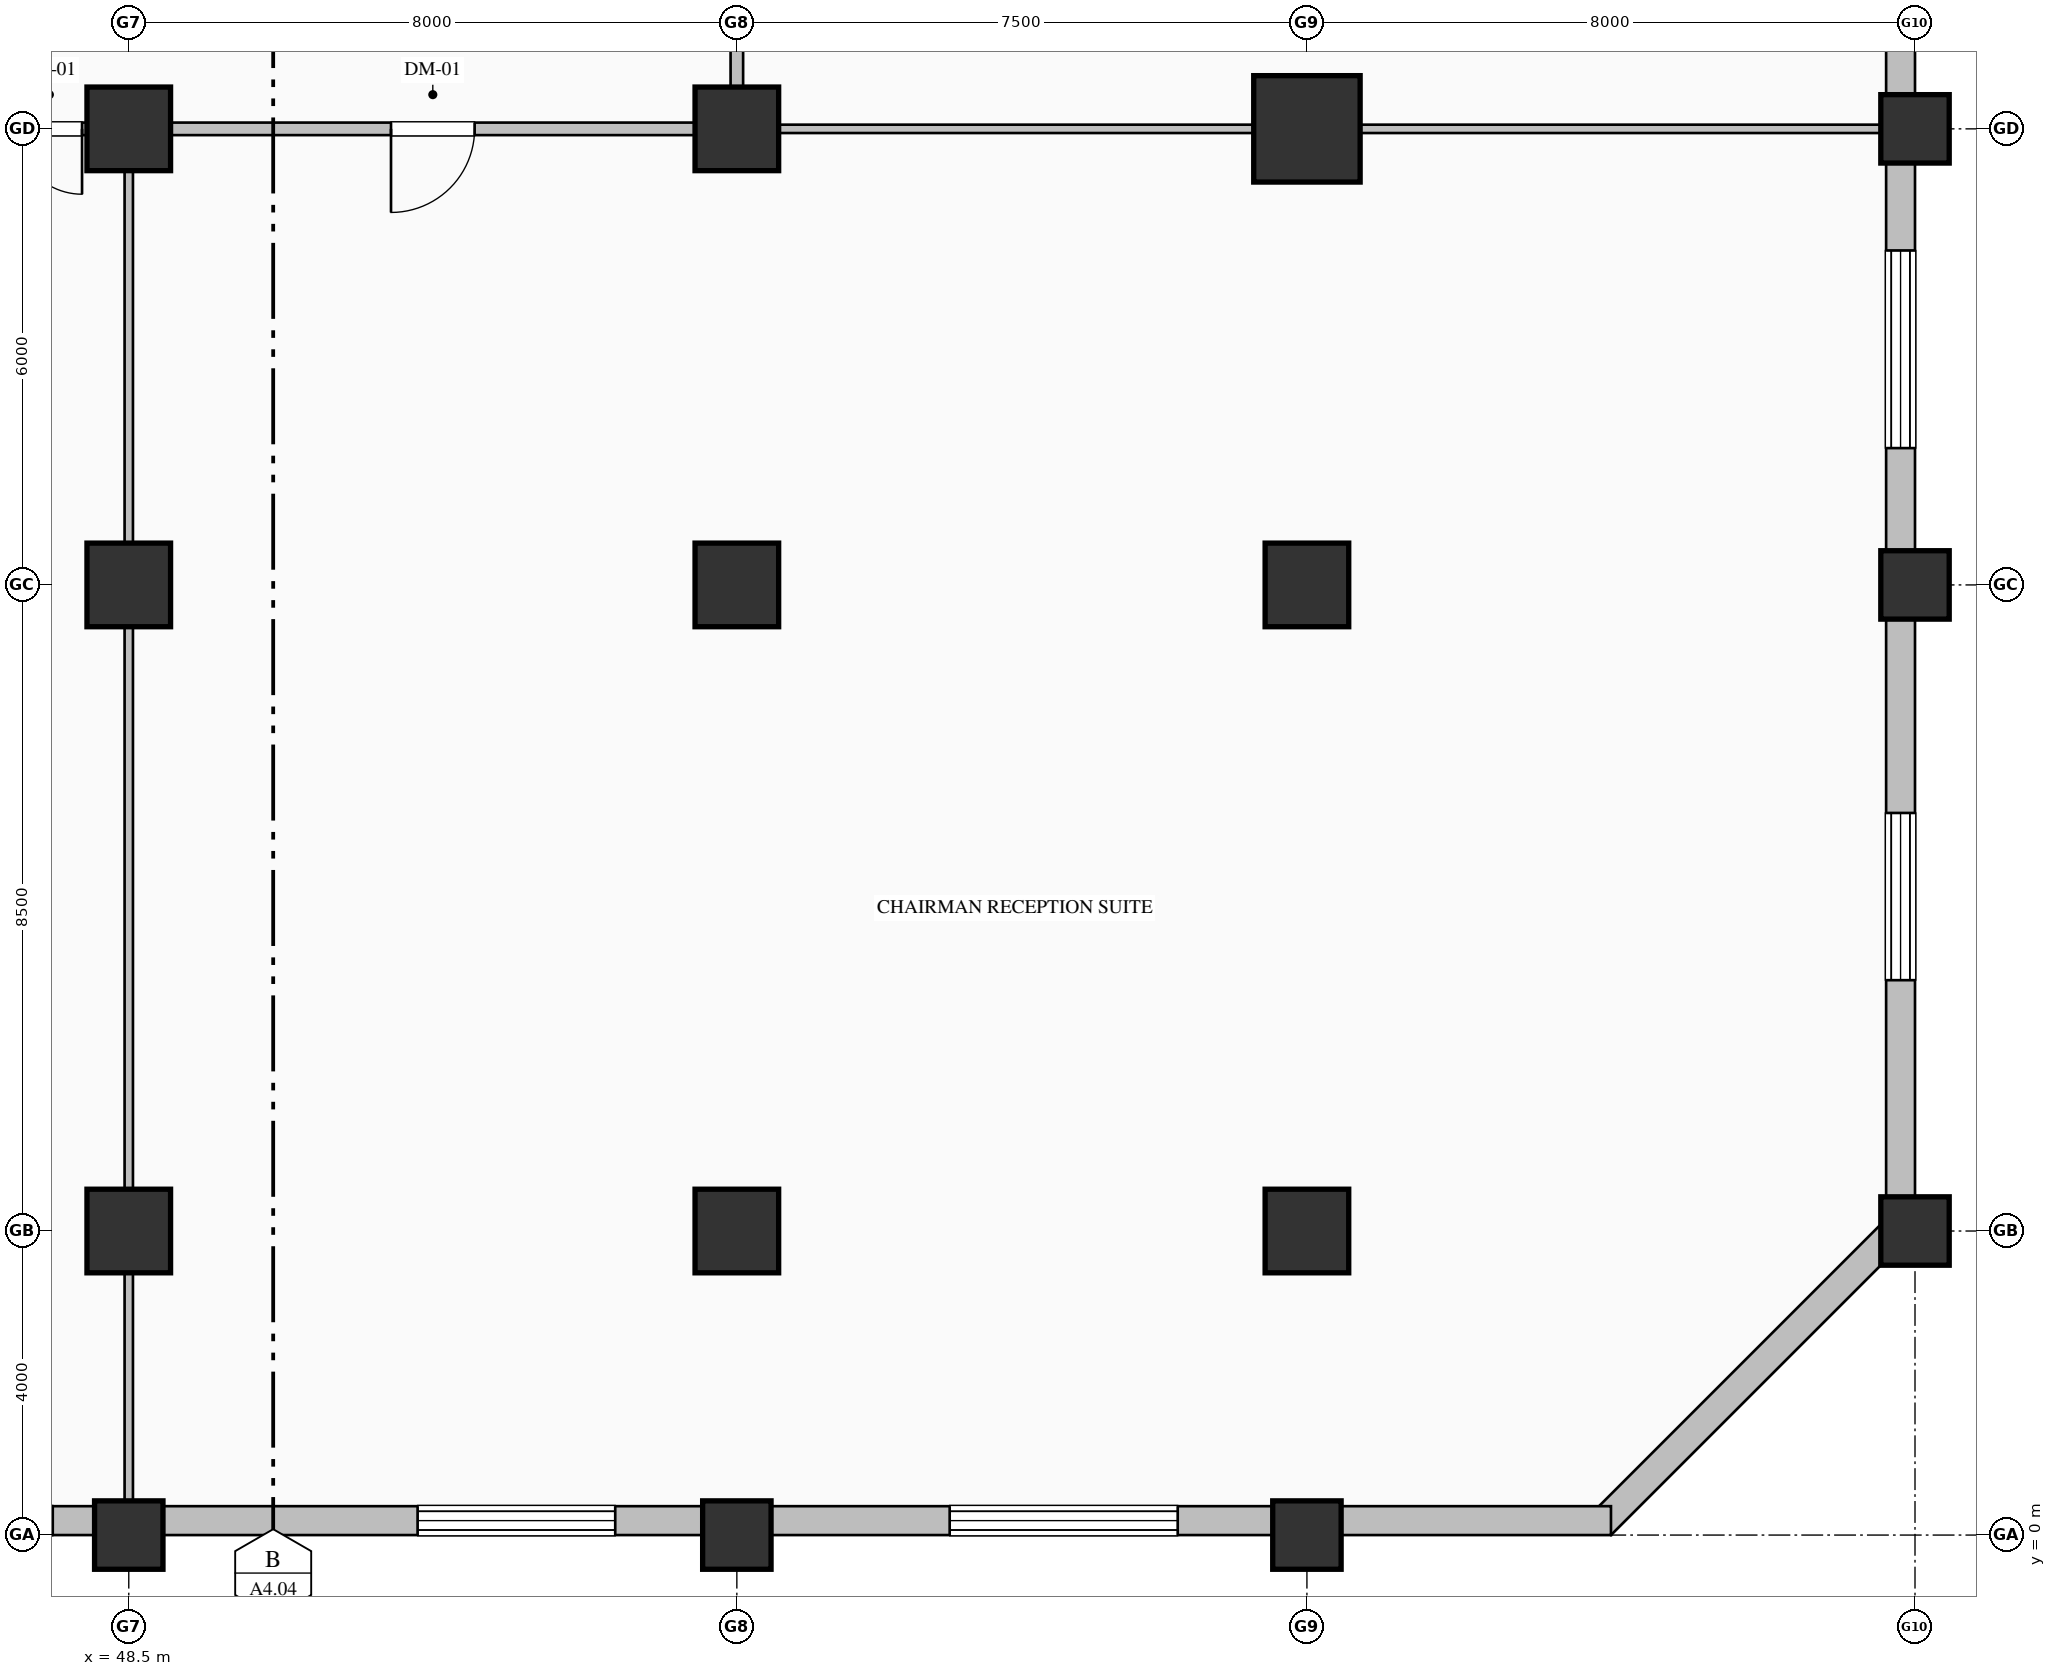
"""IFC4 building model, lengths in metres.
Left out: names, types, materials, properties, quantities, classifications, styles, units other than length and angle.
Written with IfcOpenShell. Run it as: python <this file> out.ifc"""

import sys

from ifc_helpers import new_model, si_unit, direction, frame, frame_2d, origin, origin_2d, place, context, subcontext, project, spatial, rectangle, hollow_rectangle, extrude, element, fill, save


model = new_model("IFC4")
c1 = context("Model", 3, precision=1e-05, world=origin(), true_north=direction((0.0, 1.0)))
c2 = subcontext(c1, "Body", "Model", "MODEL_VIEW")
j1 = project(units=[si_unit("LENGTHUNIT", "METRE"), si_unit("PLANEANGLEUNIT", "RADIAN")], contexts=[c1])
p1 = place(None, origin())
s1 = spatial("IfcSite", under=j1, at=p1, CompositionType="ELEMENT")
p2 = place(p1, origin())
s2 = spatial("IfcBuilding", under=s1, at=p2, CompositionType="ELEMENT")
p3 = place(p2, frame((0.0, 0.0, 11.4)))
s3 = spatial("IfcBuildingStorey", under=s2, at=p3, CompositionType="ELEMENT", Elevation=11.4)
p4 = place(p3, frame((48.5, 0.0, 0.0), z_axis=(0.0, 0.0, 1.0), x_axis=(1.0, 0.0, 0.0)))
e1 = element("IfcColumn", 1, at=p4, inside=s3, PredefinedType="PILASTER", context=c2, shape_type="SweptSolid", body=[
    extrude(rectangle(XDim=0.9, YDim=0.9, at=origin_2d()), origin(), (0.0, 0.0, 1.0), 6.0),
])
for number, where, z_axis, x_axis in (
    (2, (48.5, 4.0, 0.0), (0.0, 0.0, 1.0), (1.0, 0.0, 0.0)),
    (3, (48.5, 12.5, 0.0), (0.0, 0.0, 1.0), (1.0, 0.0, 0.0)),
    (4, (48.5, 18.5, 0.0), (0.0, 0.0, 1.0), (1.0, 0.0, 0.0)),
):
    element("IfcColumn", number, at=place(p3, frame(where, z_axis=z_axis, x_axis=x_axis)), inside=s3, PredefinedType="COLUMN", context=c2, shape_type="SweptSolid", body=[
        extrude(rectangle(XDim=1.1, YDim=1.1, at=origin_2d()), origin(), (0.0, 0.0, 1.0), 6.0),
    ])
p5 = place(p3, frame((56.5, 0.0, 0.0), z_axis=(0.0, 0.0, 1.0), x_axis=(1.0, 0.0, 0.0)))
e5 = element("IfcColumn", 5, at=p5, inside=s3, PredefinedType="PILASTER", context=c2, shape_type="SweptSolid", body=[
    extrude(rectangle(XDim=0.9, YDim=0.9, at=origin_2d()), origin(), (0.0, 0.0, 1.0), 6.0),
])
for number, where, z_axis, x_axis in (
    (6, (56.5, 4.0, 0.0), (0.0, 0.0, 1.0), (1.0, 0.0, 0.0)),
    (7, (56.5, 12.5, 0.0), (0.0, 0.0, 1.0), (1.0, 0.0, 0.0)),
    (8, (56.5, 18.5, 0.0), (0.0, 0.0, 1.0), (1.0, 0.0, 0.0)),
):
    element("IfcColumn", number, at=place(p3, frame(where, z_axis=z_axis, x_axis=x_axis)), inside=s3, PredefinedType="COLUMN", context=c2, shape_type="SweptSolid", body=[
        extrude(rectangle(XDim=1.1, YDim=1.1, at=origin_2d()), origin(), (0.0, 0.0, 1.0), 6.0),
    ])
p6 = place(p3, frame((64.0, 0.0, 0.0), z_axis=(0.0, 0.0, 1.0), x_axis=(1.0, 0.0, 0.0)))
e9 = element("IfcColumn", 9, at=p6, inside=s3, PredefinedType="PILASTER", context=c2, shape_type="SweptSolid", body=[
    extrude(rectangle(XDim=0.9, YDim=0.9, at=origin_2d()), origin(), (0.0, 0.0, 1.0), 6.0),
])
for number, where, z_axis, x_axis in (
    (10, (64.0, 4.0, 0.0), (0.0, 0.0, 1.0), (1.0, 0.0, 0.0)),
    (11, (64.0, 12.5, 0.0), (0.0, 0.0, 1.0), (1.0, 0.0, 0.0)),
):
    element("IfcColumn", number, at=place(p3, frame(where, z_axis=z_axis, x_axis=x_axis)), inside=s3, PredefinedType="COLUMN", context=c2, shape_type="SweptSolid", body=[
        extrude(rectangle(XDim=1.1, YDim=1.1, at=origin_2d()), origin(), (0.0, 0.0, 1.0), 6.0),
    ])
p7 = place(p3, frame((64.0, 18.5, 0.0), z_axis=(0.0, 0.0, 1.0), x_axis=(1.0, 0.0, 0.0)))
e12 = element("IfcColumn", 12, at=p7, inside=s3, PredefinedType="COLUMN", context=c2, shape_type="SweptSolid", body=[
    extrude(hollow_rectangle(XDim=1.4, YDim=1.4, WallThickness=0.05, at=origin_2d()), origin(), (0.0, 0.0, 1.0), 6.0),
])
for number, where, z_axis, x_axis in (
    (13, (72.0, 4.0, 0.0), (0.0, 0.0, 1.0), (1.0, 0.0, 0.0)),
    (14, (72.0, 12.5, 0.0), (0.0, 0.0, 1.0), (1.0, 0.0, 0.0)),
    (15, (72.0, 18.5, 0.0), (0.0, 0.0, 1.0), (1.0, 0.0, 0.0)),
):
    element("IfcColumn", number, at=place(p3, frame(where, z_axis=z_axis, x_axis=x_axis)), inside=s3, PredefinedType="PILASTER", context=c2, shape_type="SweptSolid", body=[
        extrude(rectangle(XDim=0.9, YDim=0.9, at=origin_2d()), origin(), (0.0, 0.0, 1.0), 6.0),
    ])
p8 = place(p3, frame((71.81, 48.0, 0.0), z_axis=(0.0, 0.0, 1.0), x_axis=(0.0, -1.0, 0.0)))
e16 = element("IfcWall", 16, at=p8, inside=s3, PredefinedType="SOLIDWALL", context=c2, shape_type="SweptSolid", body=[
    extrude(rectangle(XDim=44.0, YDim=0.38, at=frame_2d((22.0, 0.0))), origin(), (0.0, 0.0, 1.0), 5.05),
])
p9 = place(p8, frame((6.1, 0.0, 0.9)))
e17 = element("IfcOpeningElement", 17, at=p9, cuts=e16, PredefinedType="OPENING", context=c2, shape_type="SweptSolid", body=[
    extrude(rectangle(XDim=2.2, YDim=2.65, at=frame_2d((1.1, 1.325))), frame((0.0, 0.2, 0.0), z_axis=(0.0, -1.0, 0.0), x_axis=(1.0, 0.0, 0.0)), (0.0, 0.0, 1.0), 0.4),
])
p10 = place(p8, frame((12.9, 0.0, 0.85)))
e18 = element("IfcOpeningElement", 18, at=p10, cuts=e16, PredefinedType="OPENING", context=c2, shape_type="SweptSolid", body=[
    extrude(rectangle(XDim=3.0, YDim=3.2, at=frame_2d((1.5, 1.6))), frame((0.0, 0.2, 0.0), z_axis=(0.0, -1.0, 0.0), x_axis=(1.0, 0.0, 0.0)), (0.0, 0.0, 1.0), 0.4),
])
p11 = place(p8, frame((16.9, 0.0, 0.9)))
e19 = element("IfcOpeningElement", 19, at=p11, cuts=e16, PredefinedType="OPENING", context=c2, shape_type="SweptSolid", body=[
    extrude(rectangle(XDim=2.2, YDim=2.65, at=frame_2d((1.1, 1.325))), frame((0.0, 0.2, 0.0), z_axis=(0.0, -1.0, 0.0), x_axis=(1.0, 0.0, 0.0)), (0.0, 0.0, 1.0), 0.4),
])
p12 = place(p8, frame((23.7, 0.0, 0.85)))
e20 = element("IfcOpeningElement", 20, at=p12, cuts=e16, PredefinedType="OPENING", context=c2, shape_type="SweptSolid", body=[
    extrude(rectangle(XDim=3.0, YDim=3.2, at=frame_2d((1.5, 1.6))), frame((0.0, 0.2, 0.0), z_axis=(0.0, -1.0, 0.0), x_axis=(1.0, 0.0, 0.0)), (0.0, 0.0, 1.0), 0.4),
])
p13 = place(p8, frame((31.1, 0.0, 0.85)))
e21 = element("IfcOpeningElement", 21, at=p13, cuts=e16, PredefinedType="OPENING", context=c2, shape_type="SweptSolid", body=[
    extrude(rectangle(XDim=2.6, YDim=3.1, at=frame_2d((1.3, 1.55))), frame((0.0, 0.2, 0.0), z_axis=(0.0, -1.0, 0.0), x_axis=(1.0, 0.0, 0.0)), (0.0, 0.0, 1.0), 0.4),
])
p14 = place(p8, frame((38.5, 0.0, 0.9)))
e22 = element("IfcOpeningElement", 22, at=p14, cuts=e16, PredefinedType="OPENING", context=c2, shape_type="SweptSolid", body=[
    extrude(rectangle(XDim=2.2, YDim=2.65, at=frame_2d((1.1, 1.325))), frame((0.0, 0.2, 0.0), z_axis=(0.0, -1.0, 0.0), x_axis=(1.0, 0.0, 0.0)), (0.0, 0.0, 1.0), 0.4),
])
p15 = place(p3, frame((71.866, 4.134, 0.0), z_axis=(0.0, 0.0, 1.0), x_axis=(-0.707106781187, -0.707106781187, 0.0)))
e23 = element("IfcWall", 23, at=p15, inside=s3, PredefinedType="SOLIDWALL", context=c2, shape_type="SweptSolid", body=[
    extrude(rectangle(XDim=5.657, YDim=0.38, at=frame_2d((2.828, 0.0))), origin(), (0.0, 0.0, 1.0), 4.15),
])
p16 = place(p3, frame((68.0, 0.19, 0.0), z_axis=(0.0, 0.0, 1.0), x_axis=(-1.0, 0.0, 0.0)))
e24 = element("IfcWall", 24, at=p16, inside=s3, PredefinedType="SOLIDWALL", context=c2, shape_type="SweptSolid", body=[
    extrude(rectangle(XDim=64.0, YDim=0.38, at=frame_2d((32.0, 0.0))), origin(), (0.0, 0.0, 1.0), 5.05),
])
p17 = place(p16, frame((5.7, 0.0, 0.85)))
e25 = element("IfcOpeningElement", 25, at=p17, cuts=e24, PredefinedType="OPENING", context=c2, shape_type="SweptSolid", body=[
    extrude(rectangle(XDim=3.0, YDim=3.2, at=frame_2d((1.5, 1.6))), frame((0.0, 0.2, 0.0), z_axis=(0.0, -1.0, 0.0), x_axis=(1.0, 0.0, 0.0)), (0.0, 0.0, 1.0), 0.4),
])
p18 = place(p16, frame((13.1, 0.0, 0.85)))
e26 = element("IfcOpeningElement", 26, at=p18, cuts=e24, PredefinedType="OPENING", context=c2, shape_type="SweptSolid", body=[
    extrude(rectangle(XDim=2.6, YDim=3.1, at=frame_2d((1.3, 1.55))), frame((0.0, 0.2, 0.0), z_axis=(0.0, -1.0, 0.0), x_axis=(1.0, 0.0, 0.0)), (0.0, 0.0, 1.0), 0.4),
])
p19 = place(p16, frame((20.5, 0.0, 0.9)))
e27 = element("IfcOpeningElement", 27, at=p19, cuts=e24, PredefinedType="OPENING", context=c2, shape_type="SweptSolid", body=[
    extrude(rectangle(XDim=2.2, YDim=2.65, at=frame_2d((1.1, 1.325))), frame((0.0, 0.2, 0.0), z_axis=(0.0, -1.0, 0.0), x_axis=(1.0, 0.0, 0.0)), (0.0, 0.0, 1.0), 0.4),
])
p20 = place(p16, frame((23.9, 0.0, 0.85)))
e28 = element("IfcOpeningElement", 28, at=p20, cuts=e24, PredefinedType="OPENING", context=c2, shape_type="SweptSolid", body=[
    extrude(rectangle(XDim=2.6, YDim=3.1, at=frame_2d((1.3, 1.55))), frame((0.0, 0.2, 0.0), z_axis=(0.0, -1.0, 0.0), x_axis=(1.0, 0.0, 0.0)), (0.0, 0.0, 1.0), 0.4),
])
p21 = place(p16, frame((31.3, 0.0, 0.9)))
e29 = element("IfcOpeningElement", 29, at=p21, cuts=e24, PredefinedType="OPENING", context=c2, shape_type="SweptSolid", body=[
    extrude(rectangle(XDim=2.2, YDim=2.65, at=frame_2d((1.1, 1.325))), frame((0.0, 0.2, 0.0), z_axis=(0.0, -1.0, 0.0), x_axis=(1.0, 0.0, 0.0)), (0.0, 0.0, 1.0), 0.4),
])
p22 = place(p16, frame((38.1, 0.0, 0.85)))
e30 = element("IfcOpeningElement", 30, at=p22, cuts=e24, PredefinedType="OPENING", context=c2, shape_type="SweptSolid", body=[
    extrude(rectangle(XDim=3.0, YDim=3.2, at=frame_2d((1.5, 1.6))), frame((0.0, 0.2, 0.0), z_axis=(0.0, -1.0, 0.0), x_axis=(1.0, 0.0, 0.0)), (0.0, 0.0, 1.0), 0.4),
])
p23 = place(p16, frame((45.5, 0.0, 0.85)))
e31 = element("IfcOpeningElement", 31, at=p23, cuts=e24, PredefinedType="OPENING", context=c2, shape_type="SweptSolid", body=[
    extrude(rectangle(XDim=2.6, YDim=3.1, at=frame_2d((1.3, 1.55))), frame((0.0, 0.2, 0.0), z_axis=(0.0, -1.0, 0.0), x_axis=(1.0, 0.0, 0.0)), (0.0, 0.0, 1.0), 0.4),
])
p24 = place(p16, frame((52.9, 0.0, 0.9)))
e32 = element("IfcOpeningElement", 32, at=p24, cuts=e24, PredefinedType="OPENING", context=c2, shape_type="SweptSolid", body=[
    extrude(rectangle(XDim=2.2, YDim=2.65, at=frame_2d((1.1, 1.325))), frame((0.0, 0.2, 0.0), z_axis=(0.0, -1.0, 0.0), x_axis=(1.0, 0.0, 0.0)), (0.0, 0.0, 1.0), 0.4),
])
p25 = place(p3, frame((56.5, 31.726, 0.0), z_axis=(0.0, 0.0, 1.0), x_axis=(0.0, -1.0, 0.0)))
e33 = element("IfcWall", 33, at=p25, inside=s3, PredefinedType="PARTITIONING", context=c2, shape_type="SweptSolid", body=[
    extrude(rectangle(XDim=13.151, YDim=0.165, at=frame_2d((6.576, 0.0))), origin(), (0.0, 0.0, 1.0), 4.642),
])
p26 = place(p25, frame((5.575, 0.0, 0.0)))
e34 = element("IfcOpeningElement", 34, at=p26, cuts=e33, PredefinedType="OPENING", context=c2, shape_type="SweptSolid", body=[
    extrude(rectangle(XDim=2.0, YDim=2.4, at=frame_2d((1.0, 1.2))), frame((0.0, 0.093, 0.0), z_axis=(0.0, -1.0, 0.0), x_axis=(1.0, 0.0, 0.0)), (0.0, 0.0, 1.0), 0.185),
])
p27 = place(p3, frame((48.5, 18.5, 0.0), z_axis=(0.0, 0.0, 1.0), x_axis=(-1.0, 0.0, 0.0)))
e35 = element("IfcWall", 35, at=p27, inside=s3, PredefinedType="PARTITIONING", context=c2, shape_type="SweptSolid", body=[
    extrude(rectangle(XDim=16.0, YDim=0.165, at=frame_2d((8.0, 0.0))), origin(), (0.0, 0.0, 1.0), 4.642),
])
p28 = place(p27, frame((0.615, 0.0, 0.0)))
e36 = element("IfcOpeningElement", 36, at=p28, cuts=e35, PredefinedType="OPENING", context=c2, shape_type="SweptSolid", body=[
    extrude(rectangle(XDim=0.86, YDim=2.1, at=frame_2d((0.43, 1.05))), frame((0.0, 0.093, 0.0), z_axis=(0.0, -1.0, 0.0), x_axis=(1.0, 0.0, 0.0)), (0.0, 0.0, 1.0), 0.185),
])
p29 = place(p3, frame((56.5, 18.5, 0.0), z_axis=(0.0, 0.0, 1.0), x_axis=(-1.0, 0.0, 0.0)))
e37 = element("IfcWall", 37, at=p29, inside=s3, PredefinedType="PARTITIONING", context=c2, shape_type="SweptSolid", body=[
    extrude(rectangle(XDim=8.0, YDim=0.165, at=frame_2d((4.0, 0.0))), origin(), (0.0, 0.0, 1.0), 4.642),
])
p30 = place(p29, frame((3.45, 0.0, 0.0)))
e38 = element("IfcOpeningElement", 38, at=p30, cuts=e37, PredefinedType="OPENING", context=c2, shape_type="SweptSolid", body=[
    extrude(rectangle(XDim=1.1, YDim=2.2, at=frame_2d((0.55, 1.1))), frame((0.0, 0.093, 0.0), z_axis=(0.0, -1.0, 0.0), x_axis=(1.0, 0.0, 0.0)), (0.0, 0.0, 1.0), 0.185),
])
p31 = place(p3, frame((71.628, 18.5, 0.0), z_axis=(0.0, 0.0, 1.0), x_axis=(-1.0, 0.0, 0.0)))
e39 = element("IfcWall", 39, at=p31, inside=s3, PredefinedType="MOVABLE", context=c2, shape_type="SweptSolid", body=[
    extrude(rectangle(XDim=15.128, YDim=0.11, at=frame_2d((7.564, 0.0))), origin(), (0.0, 0.0, 1.0), 4.642),
])
p32 = place(p3, frame((48.5, 18.426, 0.0), z_axis=(0.0, 0.0, 1.0), x_axis=(0.0, -1.0, 0.0)))
e40 = element("IfcWall", 40, at=p32, inside=s3, PredefinedType="MOVABLE", context=c2, shape_type="SweptSolid", body=[
    extrude(rectangle(XDim=18.053, YDim=0.11, at=frame_2d((9.027, 0.0))), origin(), (0.0, 0.0, 1.0), 4.642),
])
p33 = place(p13, origin())
e41 = element("IfcWindow", 41, at=p33, inside=s3, PartitioningType="TRIPLE_PANEL_VERTICAL", PredefinedType="WINDOW", context=c2, shape_type="SweptSolid", body=[
    extrude(rectangle(XDim=2.6, YDim=3.1, at=frame_2d((1.3, 1.55))), frame((0.0, 0.15, 0.0), z_axis=(0.0, -1.0, 0.0), x_axis=(1.0, 0.0, 0.0)), (0.0, 0.0, 1.0), 0.06),
])
fill(e21, e41)
p34 = place(p14, origin())
e42 = element("IfcWindow", 42, at=p34, inside=s3, PartitioningType="TRIPLE_PANEL_VERTICAL", PredefinedType="WINDOW", context=c2, shape_type="SweptSolid", body=[
    extrude(rectangle(XDim=2.2, YDim=2.65, at=frame_2d((1.1, 1.325))), frame((0.0, 0.15, 0.0), z_axis=(0.0, -1.0, 0.0), x_axis=(1.0, 0.0, 0.0)), (0.0, 0.0, 1.0), 0.06),
])
fill(e22, e42)
p35 = place(p17, origin())
e43 = element("IfcWindow", 43, at=p35, inside=s3, PartitioningType="TRIPLE_PANEL_VERTICAL", PredefinedType="WINDOW", context=c2, shape_type="SweptSolid", body=[
    extrude(rectangle(XDim=3.0, YDim=3.2, at=frame_2d((1.5, 1.6))), frame((0.0, 0.15, 0.0), z_axis=(0.0, -1.0, 0.0), x_axis=(1.0, 0.0, 0.0)), (0.0, 0.0, 1.0), 0.06),
])
fill(e25, e43)
p36 = place(p18, origin())
e44 = element("IfcWindow", 44, at=p36, inside=s3, PartitioningType="TRIPLE_PANEL_VERTICAL", PredefinedType="WINDOW", context=c2, shape_type="SweptSolid", body=[
    extrude(rectangle(XDim=2.6, YDim=3.1, at=frame_2d((1.3, 1.55))), frame((0.0, 0.15, 0.0), z_axis=(0.0, -1.0, 0.0), x_axis=(1.0, 0.0, 0.0)), (0.0, 0.0, 1.0), 0.06),
])
fill(e26, e44)
p37 = place(p28, origin())
e45 = element("IfcDoor", 45, at=p37, inside=s3, OperationType="SINGLE_SWING_LEFT", PredefinedType="DOOR", context=c2, shape_type="SweptSolid", body=[
    extrude(rectangle(XDim=0.86, YDim=2.1, at=frame_2d((0.43, 1.05))), frame((0.0, 0.025, 0.0), z_axis=(0.0, -1.0, 0.0), x_axis=(1.0, 0.0, 0.0)), (0.0, 0.0, 1.0), 0.05),
])
fill(e36, e45)
p38 = place(p30, origin())
e46 = element("IfcDoor", 46, at=p38, inside=s3, OperationType="SINGLE_SWING_RIGHT", PredefinedType="DOOR", context=c2, shape_type="SweptSolid", body=[
    extrude(rectangle(XDim=1.1, YDim=2.2, at=frame_2d((0.55, 1.1))), frame((0.0, 0.025, 0.0), z_axis=(0.0, -1.0, 0.0), x_axis=(1.0, 0.0, 0.0)), (0.0, 0.0, 1.0), 0.05),
])
fill(e38, e46)
save(model, sys.argv[1])
